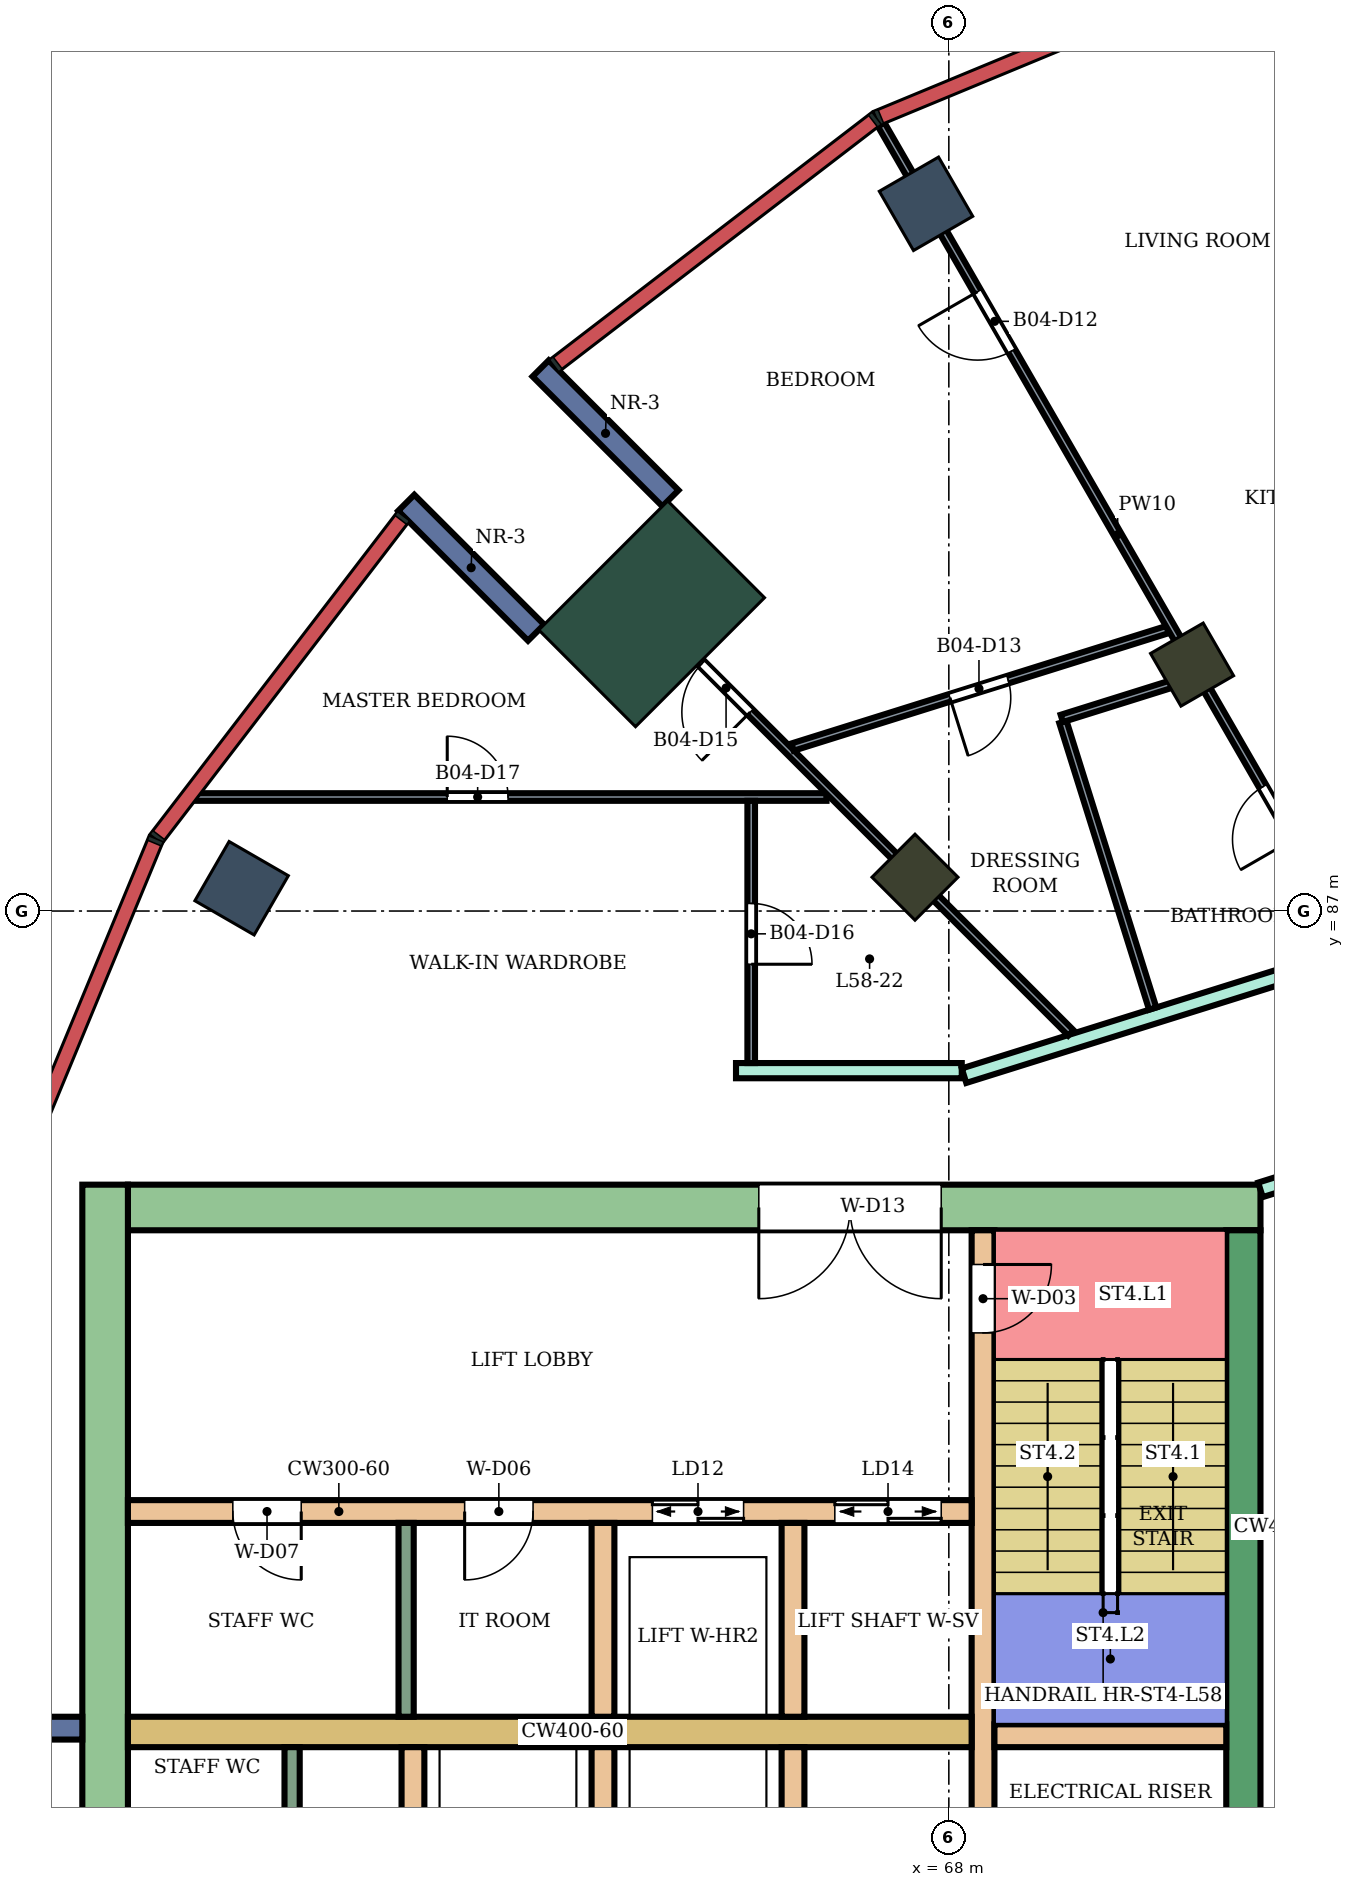
"""IFC4 building model, lengths in metres.
Left out: names, types, materials, properties, quantities, classifications, styles, units other than length and angle.
Written with IfcOpenShell. Run it as: python <this file> out.ifc"""

import sys

from ifc_helpers import new_model, si_unit, direction, frame, frame_2d, origin, origin_2d, place, context, subcontext, project, spatial, rectangle, extrude, element, fill, save


model = new_model("IFC4")
c1 = context("Model", 3, precision=1e-05, world=origin(), true_north=direction((0.0, 1.0)))
c2 = subcontext(c1, "Body", "Model", "MODEL_VIEW")
j1 = project(units=[si_unit("LENGTHUNIT", "METRE"), si_unit("PLANEANGLEUNIT", "RADIAN")], contexts=[c1])
p1 = place(None, origin())
s1 = spatial("IfcSite", under=j1, at=p1, CompositionType="ELEMENT")
p2 = place(p1, origin())
s2 = spatial("IfcBuilding", under=s1, at=p2, CompositionType="ELEMENT")
p3 = place(p2, frame((0.0, 0.0, 254.1)))
s3 = spatial("IfcBuildingStorey", under=s2, at=p3, CompositionType="ELEMENT", Elevation=254.1)
for number, where, z_axis, x_axis in (
    (1, (67.7, 96.304, 0.0), (0.0, 0.0, 1.0), (-0.5, 0.866, 0.0)),
    (2, (58.696, 87.3, 0.0), (0.0, 0.0, 1.0), (-0.866, 0.5, 0.0)),
):
    element("IfcColumn", number, at=place(p3, frame(where, z_axis=z_axis, x_axis=x_axis)), inside=s3, PredefinedType="COLUMN", context=c2, shape_type="SweptSolid", body=[
        extrude(rectangle(XDim=0.9, YDim=0.9, at=origin_2d()), origin(), (0.0, 0.0, 1.0), 4.2),
    ])
for number, where, z_axis, x_axis in (
    (3, (71.2, 90.242, 0.0), (0.0, 0.0, 1.0), (-0.5, 0.866, 0.0)),
    (4, (67.555, 87.445, 0.0), (0.0, 0.0, 1.0), (-0.707, 0.707, 0.0)),
):
    element("IfcColumn", number, at=place(p3, frame(where, z_axis=z_axis, x_axis=x_axis)), inside=s3, PredefinedType="COLUMN", context=c2, shape_type="SweptSolid", body=[
        extrude(rectangle(XDim=0.8, YDim=0.8, at=origin_2d()), origin(), (0.0, 0.0, 1.0), 4.2),
    ])
p4 = place(p3, frame((64.09, 90.91, 0.0), z_axis=(0.0, 0.0, 1.0), x_axis=(-0.707106781187, 0.707106781187, 0.0)))
e5 = element("IfcColumn", 5, at=p4, inside=s3, PredefinedType="COLUMN", context=c2, shape_type="SweptSolid", body=[
    extrude(rectangle(XDim=1.8, YDim=2.4, at=origin_2d()), origin(), (0.0, 0.0, 1.0), 4.2),
])
p5 = place(p3, frame((72.1, 83.1, 0.0), z_axis=(0.0, 0.0, 1.0), x_axis=(-1.0, 0.0, 0.0)))
e6 = element("IfcWall", 6, at=p5, inside=s3, PredefinedType="SHEAR", context=c2, shape_type="SweptSolid", body=[
    extrude(rectangle(XDim=14.9, YDim=0.6, at=frame_2d((7.45, 0.0))), origin(), (0.0, 0.0, 1.0), 3.88),
])
p6 = place(p5, frame((4.2, 0.0, 0.0)))
e7 = element("IfcOpeningElement", 7, at=p6, cuts=e6, PredefinedType="OPENING", context=c2, shape_type="SweptSolid", body=[
    extrude(rectangle(XDim=2.4, YDim=2.4, at=frame_2d((1.2, 1.2))), frame((0.0, 0.31, 0.0), z_axis=(0.0, -1.0, 0.0), x_axis=(1.0, 0.0, 0.0)), (0.0, 0.0, 1.0), 0.62),
])
p7 = place(p3, frame((71.875, 82.8, 0.0), z_axis=(0.0, 0.0, 1.0), x_axis=(0.0, -1.0, 0.0)))
e8 = element("IfcWall", 8, at=p7, inside=s3, PredefinedType="SHEAR", context=c2, shape_type="SweptSolid", body=[
    extrude(rectangle(XDim=7.8, YDim=0.45, at=frame_2d((3.9, 0.0))), origin(), (0.0, 0.0, 1.0), 3.88),
])
p8 = place(p3, frame((56.9, 83.4, 0.0), z_axis=(0.0, 0.0, 1.0), x_axis=(0.0, -1.0, 0.0)))
e9 = element("IfcWall", 9, at=p8, inside=s3, PredefinedType="SHEAR", context=c2, shape_type="SweptSolid", body=[
    extrude(rectangle(XDim=16.8, YDim=0.6, at=frame_2d((8.4, 0.0))), origin(), (0.0, 0.0, 1.0), 3.88),
])
p9 = place(p3, frame((68.45, 82.8, 0.0), z_axis=(0.0, 0.0, 1.0), x_axis=(0.0, -1.0, 0.0)))
e10 = element("IfcWall", 10, at=p9, inside=s3, PredefinedType="SHEAR", context=c2, shape_type="SweptSolid", body=[
    extrude(rectangle(XDim=7.8, YDim=0.3, at=frame_2d((3.9, 0.0))), origin(), (0.0, 0.0, 1.0), 3.88),
])
p10 = place(p9, frame((0.45, 0.0, 0.0)))
e11 = element("IfcOpeningElement", 11, at=p10, cuts=e10, PredefinedType="OPENING", context=c2, shape_type="SweptSolid", body=[
    extrude(rectangle(XDim=0.9, YDim=2.1, at=frame_2d((0.45, 1.05))), frame((0.0, 0.16, 0.0), z_axis=(0.0, -1.0, 0.0), x_axis=(1.0, 0.0, 0.0)), (0.0, 0.0, 1.0), 0.32),
])
p11 = place(p3, frame((71.65, 76.15, 0.0), z_axis=(0.0, 0.0, 1.0), x_axis=(-1.0, 0.0, 0.0)))
e12 = element("IfcWall", 12, at=p11, inside=s3, PredefinedType="SHEAR", context=c2, shape_type="SweptSolid", body=[
    extrude(rectangle(XDim=3.05, YDim=0.3, at=frame_2d((1.525, 0.0))), origin(), (0.0, 0.0, 1.0), 3.88),
])
p12 = place(p3, frame((68.3, 76.2, 0.0), z_axis=(0.0, 0.0, 1.0), x_axis=(-1.0, 0.0, 0.0)))
e13 = element("IfcWall", 13, at=p12, inside=s3, PredefinedType="SHEAR", context=c2, shape_type="SweptSolid", body=[
    extrude(rectangle(XDim=11.1, YDim=0.4, at=frame_2d((5.55, 0.0))), origin(), (0.0, 0.0, 1.0), 3.88),
])
p13 = place(p3, frame((68.3, 79.1, 0.0), z_axis=(0.0, 0.0, 1.0), x_axis=(-1.0, 0.0, 0.0)))
e14 = element("IfcWall", 14, at=p13, inside=s3, PredefinedType="SHEAR", context=c2, shape_type="SweptSolid", body=[
    extrude(rectangle(XDim=11.1, YDim=0.3, at=frame_2d((5.55, 0.0))), origin(), (0.0, 0.0, 1.0), 3.88),
])
p14 = place(p13, frame((0.4, 0.0, 0.0)))
e15 = element("IfcOpeningElement", 15, at=p14, cuts=e14, PredefinedType="OPENING", context=c2, shape_type="SweptSolid", body=[
    extrude(rectangle(XDim=1.4, YDim=2.1, at=frame_2d((0.7, 1.05))), frame((0.0, 0.16, 0.0), z_axis=(0.0, -1.0, 0.0), x_axis=(1.0, 0.0, 0.0)), (0.0, 0.0, 1.0), 0.32),
])
p15 = place(p13, frame((3.0, 0.0, 0.0)))
e16 = element("IfcOpeningElement", 16, at=p15, cuts=e14, PredefinedType="OPENING", context=c2, shape_type="SweptSolid", body=[
    extrude(rectangle(XDim=1.2, YDim=2.1, at=frame_2d((0.6, 1.05))), frame((0.0, 0.16, 0.0), z_axis=(0.0, -1.0, 0.0), x_axis=(1.0, 0.0, 0.0)), (0.0, 0.0, 1.0), 0.32),
])
p16 = place(p13, frame((5.77, 0.0, 0.0)))
e17 = element("IfcOpeningElement", 17, at=p16, cuts=e14, PredefinedType="OPENING", context=c2, shape_type="SweptSolid", body=[
    extrude(rectangle(XDim=0.9, YDim=2.1, at=frame_2d((0.45, 1.05))), frame((0.0, 0.16, 0.0), z_axis=(0.0, -1.0, 0.0), x_axis=(1.0, 0.0, 0.0)), (0.0, 0.0, 1.0), 0.32),
])
p17 = place(p13, frame((8.82, 0.0, 0.0)))
e18 = element("IfcOpeningElement", 18, at=p17, cuts=e14, PredefinedType="OPENING", context=c2, shape_type="SweptSolid", body=[
    extrude(rectangle(XDim=0.9, YDim=2.1, at=frame_2d((0.45, 1.05))), frame((0.0, 0.16, 0.0), z_axis=(0.0, -1.0, 0.0), x_axis=(1.0, 0.0, 0.0)), (0.0, 0.0, 1.0), 0.32),
])
for number, where, z_axis, x_axis in (
    (19, (65.95, 76.0, 0.0), (0.0, 0.0, 1.0), (0.0, -1.0, 0.0)),
    (20, (63.45, 76.0, 0.0), (0.0, 0.0, 1.0), (0.0, -1.0, 0.0)),
    (21, (60.95, 76.0, 0.0), (0.0, 0.0, 1.0), (0.0, -1.0, 0.0)),
    (22, (65.95, 78.95, 0.0), (0.0, 0.0, 1.0), (0.0, -1.0, 0.0)),
    (23, (63.45, 78.95, 0.0), (0.0, 0.0, 1.0), (0.0, -1.0, 0.0)),
):
    element("IfcWall", number, at=place(p3, frame(where, z_axis=z_axis, x_axis=x_axis)), inside=s3, PredefinedType="SHEAR", context=c2, shape_type="SweptSolid", body=[
        extrude(rectangle(XDim=2.55, YDim=0.3, at=frame_2d((1.275, 0.0))), origin(), (0.0, 0.0, 1.0), 3.88),
    ])
for number, where, z_axis, x_axis in (
    (24, (64.338, 92.43, 0.0), (0.0, 0.0, 1.0), (-0.707, 0.707, 0.0)),
    (25, (62.57, 90.662, 0.0), (0.0, 0.0, 1.0), (-0.707, 0.707, 0.0)),
    (26, (56.6, 76.25, 0.0), (0.0, 0.0, 1.0), (-1.0, 0.0, 0.0)),
):
    element("IfcWall", number, at=place(p3, frame(where, z_axis=z_axis, x_axis=x_axis)), inside=s3, PredefinedType="NOTDEFINED", context=c2, shape_type="SweptSolid", body=[
        extrude(rectangle(XDim=2.416, YDim=0.3, at=frame_2d((1.208, 0.0))), origin(), (0.0, 0.0, 1.0), 4.2),
    ])
p18 = place(p3, frame((65.2, 84.9, 0.0), z_axis=(0.0, 0.0, 1.0), x_axis=(1.0, 0.0, 0.0)))
e27 = element("IfcWall", 27, at=p18, inside=s3, PredefinedType="PARTITIONING", context=c2, shape_type="SweptSolid", body=[
    extrude(rectangle(XDim=2.97, YDim=0.2, at=frame_2d((1.485, 0.0))), origin(), (0.0, 0.0, 1.0), 3.75),
])
p19 = place(p3, frame((68.2, 84.834, 0.0), z_axis=(0.0, 0.0, 1.0), x_axis=(0.954260265251, 0.298977166624, 0.0)))
e28 = element("IfcWall", 28, at=p19, inside=s3, PredefinedType="PARTITIONING", context=c2, shape_type="SweptSolid", body=[
    extrude(rectangle(XDim=5.741, YDim=0.2, at=frame_2d((2.87, 0.0))), origin(), (0.0, 0.0, 1.0), 3.75),
])
p20 = place(p3, frame((72.1, 83.332, 0.0), z_axis=(0.0, 0.0, 1.0), x_axis=(0.954233106619, 0.299063836383, 0.0)))
e29 = element("IfcWall", 29, at=p20, inside=s3, PredefinedType="PARTITIONING", context=c2, shape_type="SweptSolid", body=[
    extrude(rectangle(XDim=2.414, YDim=0.2, at=frame_2d((1.207, 0.0))), origin(), (0.0, 0.0, 1.0), 3.75),
])
p21 = place(p20, frame((0.762, 0.0, 0.0)))
e30 = element("IfcOpeningElement", 30, at=p21, cuts=e29, PredefinedType="OPENING", context=c2, shape_type="SweptSolid", body=[
    extrude(rectangle(XDim=0.9, YDim=2.1, at=frame_2d((0.45, 1.05))), frame((0.0, 0.11, 0.0), z_axis=(0.0, -1.0, 0.0), x_axis=(1.0, 0.0, 0.0)), (0.0, 0.0, 1.0), 0.22),
])
p22 = place(p3, frame((58.072, 88.5, 0.0), z_axis=(0.0, 0.0, 1.0), x_axis=(1.0, 0.0, 0.0)))
e31 = element("IfcWall", 31, at=p22, inside=s3, PredefinedType="PARTITIONING", context=c2, shape_type="SweptSolid", body=[
    extrude(rectangle(XDim=8.319, YDim=0.1, at=frame_2d((4.159, 0.0))), origin(), (0.0, 0.0, 1.0), 3.75),
])
p23 = place(p22, frame((3.329, 0.0, 0.0)))
e32 = element("IfcOpeningElement", 32, at=p23, cuts=e31, PredefinedType="OPENING", context=c2, shape_type="SweptSolid", body=[
    extrude(rectangle(XDim=0.8, YDim=2.1, at=frame_2d((0.4, 1.05))), frame((0.0, 0.06, 0.0), z_axis=(0.0, -1.0, 0.0), x_axis=(1.0, 0.0, 0.0)), (0.0, 0.0, 1.0), 0.12),
])
p24 = place(p3, frame((63.597, 91.407, 0.0), z_axis=(0.0, 0.0, 1.0), x_axis=(0.70700623685, -0.707207311228, 0.0)))
e33 = element("IfcWall", 33, at=p24, inside=s3, PredefinedType="PARTITIONING", context=c2, shape_type="SweptSolid", body=[
    extrude(rectangle(XDim=8.499, YDim=0.1, at=frame_2d((4.25, 0.0))), origin(), (0.0, 0.0, 1.0), 3.75),
])
p25 = place(p24, frame((1.632, 0.0, 0.0)))
e34 = element("IfcOpeningElement", 34, at=p25, cuts=e33, PredefinedType="OPENING", context=c2, shape_type="SweptSolid", body=[
    extrude(rectangle(XDim=0.9, YDim=2.1, at=frame_2d((0.45, 1.05))), frame((0.0, 0.06, 0.0), z_axis=(0.0, -1.0, 0.0), x_axis=(1.0, 0.0, 0.0)), (0.0, 0.0, 1.0), 0.12),
])
p26 = place(p3, frame((65.4, 85.0, 0.0), z_axis=(0.0, 0.0, 1.0), x_axis=(0.0, 1.0, 0.0)))
e35 = element("IfcWall", 35, at=p26, inside=s3, PredefinedType="PARTITIONING", context=c2, shape_type="SweptSolid", body=[
    extrude(rectangle(XDim=3.45, YDim=0.1, at=frame_2d((1.725, 0.0))), origin(), (0.0, 0.0, 1.0), 3.75),
])
p27 = place(p26, frame((1.3, 0.0, 0.0)))
e36 = element("IfcOpeningElement", 36, at=p27, cuts=e35, PredefinedType="OPENING", context=c2, shape_type="SweptSolid", body=[
    extrude(rectangle(XDim=0.8, YDim=2.1, at=frame_2d((0.4, 1.05))), frame((0.0, 0.06, 0.0), z_axis=(0.0, -1.0, 0.0), x_axis=(1.0, 0.0, 0.0)), (0.0, 0.0, 1.0), 0.12),
])
p28 = place(p3, frame((65.944, 89.157, 0.0), z_axis=(0.0, 0.0, 1.0), x_axis=(0.954238484697, 0.299046675828, 0.0)))
e37 = element("IfcWall", 37, at=p28, inside=s3, PredefinedType="PARTITIONING", context=c2, shape_type="SweptSolid", body=[
    extrude(rectangle(XDim=5.169, YDim=0.1, at=frame_2d((2.585, 0.0))), origin(), (0.0, 0.0, 1.0), 3.75),
])
p29 = place(p28, frame((2.17, 0.0, 0.0)))
e38 = element("IfcOpeningElement", 38, at=p29, cuts=e37, PredefinedType="OPENING", context=c2, shape_type="SweptSolid", body=[
    extrude(rectangle(XDim=0.8, YDim=2.1, at=frame_2d((0.4, 1.05))), frame((0.0, 0.06, 0.0), z_axis=(0.0, -1.0, 0.0), x_axis=(1.0, 0.0, 0.0)), (0.0, 0.0, 1.0), 0.12),
])
p30 = place(p3, frame((67.111, 97.347, 0.0), z_axis=(0.0, 0.0, 1.0), x_axis=(0.499428303955, -0.866355221147, 0.0)))
e39 = element("IfcWall", 39, at=p30, inside=s3, PredefinedType="PARTITIONING", context=c2, shape_type="SweptSolid", body=[
    extrude(rectangle(XDim=12.456, YDim=0.1, at=frame_2d((6.228, 0.0))), origin(), (0.0, 0.0, 1.0), 3.75),
])
p31 = place(p30, frame((2.538, 0.0, 0.0)))
e40 = element("IfcOpeningElement", 40, at=p31, cuts=e39, PredefinedType="OPENING", context=c2, shape_type="SweptSolid", body=[
    extrude(rectangle(XDim=0.9, YDim=2.1, at=frame_2d((0.45, 1.05))), frame((0.0, 0.06, 0.0), z_axis=(0.0, -1.0, 0.0), x_axis=(1.0, 0.0, 0.0)), (0.0, 0.0, 1.0), 0.12),
])
p32 = place(p30, frame((10.055, 0.0, 0.0)))
e41 = element("IfcOpeningElement", 41, at=p32, cuts=e39, PredefinedType="OPENING", context=c2, shape_type="SweptSolid", body=[
    extrude(rectangle(XDim=0.8, YDim=2.1, at=frame_2d((0.4, 1.05))), frame((0.0, 0.06, 0.0), z_axis=(0.0, -1.0, 0.0), x_axis=(1.0, 0.0, 0.0)), (0.0, 0.0, 1.0), 0.12),
])
p33 = place(p3, frame((69.501, 89.486, 0.0), z_axis=(0.0, 0.0, 1.0), x_axis=(0.298971609069, -0.954262006459, 0.0)))
e42 = element("IfcWall", 42, at=p33, inside=s3, PredefinedType="PARTITIONING", context=c2, shape_type="SweptSolid", body=[
    extrude(rectangle(XDim=3.951, YDim=0.1, at=frame_2d((1.975, 0.0))), origin(), (0.0, 0.0, 1.0), 3.75),
])
p34 = place(p3, frame((69.486, 89.534, 0.0), z_axis=(0.0, 0.0, 1.0), x_axis=(0.954254575134, 0.298995327449, 0.0)))
e43 = element("IfcWall", 43, at=p34, inside=s3, PredefinedType="PARTITIONING", context=c2, shape_type="SweptSolid", body=[
    extrude(rectangle(XDim=1.833, YDim=0.1, at=frame_2d((0.917, 0.0))), origin(), (0.0, 0.0, 1.0), 3.75),
])
for number, where, z_axis, x_axis in (
    (44, (59.36, 76.0, 0.0), (0.0, 0.0, 1.0), (0.0, -1.0, 0.0)),
    (45, (60.86, 78.95, 0.0), (0.0, 0.0, 1.0), (0.0, -1.0, 0.0)),
):
    element("IfcWall", number, at=place(p3, frame(where, z_axis=z_axis, x_axis=x_axis)), inside=s3, PredefinedType="PARTITIONING", context=c2, shape_type="SweptSolid", body=[
        extrude(rectangle(XDim=2.55, YDim=0.2, at=frame_2d((1.275, 0.0))), origin(), (0.0, 0.0, 1.0), 3.88),
    ])
p35 = place(p31, frame((0.9, 0.0, 0.0), z_axis=(0.0, 0.0, 1.0), x_axis=(-1.0, 0.0, 0.0)))
e46 = element("IfcDoor", 46, at=p35, inside=s3, OperationType="SINGLE_SWING_RIGHT", PredefinedType="DOOR", context=c2, shape_type="SweptSolid", body=[
    extrude(rectangle(XDim=0.9, YDim=2.1, at=frame_2d((0.45, 1.05))), frame((0.0, 0.025, 0.0), z_axis=(0.0, -1.0, 0.0), x_axis=(1.0, 0.0, 0.0)), (0.0, 0.0, 1.0), 0.05),
])
fill(e40, e46)
p36 = place(p29, frame((0.8, 0.0, 0.0), z_axis=(0.0, 0.0, 1.0), x_axis=(-1.0, 0.0, 0.0)))
e47 = element("IfcDoor", 47, at=p36, inside=s3, OperationType="SINGLE_SWING_RIGHT", PredefinedType="DOOR", context=c2, shape_type="SweptSolid", body=[
    extrude(rectangle(XDim=0.8, YDim=2.1, at=frame_2d((0.4, 1.05))), frame((0.0, 0.025, 0.0), z_axis=(0.0, -1.0, 0.0), x_axis=(1.0, 0.0, 0.0)), (0.0, 0.0, 1.0), 0.05),
])
fill(e38, e47)
p37 = place(p32, frame((0.8, 0.0, 0.0), z_axis=(0.0, 0.0, 1.0), x_axis=(-1.0, 0.0, 0.0)))
e48 = element("IfcDoor", 48, at=p37, inside=s3, OperationType="SINGLE_SWING_LEFT", PredefinedType="DOOR", context=c2, shape_type="SweptSolid", body=[
    extrude(rectangle(XDim=0.8, YDim=2.1, at=frame_2d((0.4, 1.05))), frame((0.0, 0.025, 0.0), z_axis=(0.0, -1.0, 0.0), x_axis=(1.0, 0.0, 0.0)), (0.0, 0.0, 1.0), 0.05),
])
fill(e41, e48)
p38 = place(p25, frame((0.9, 0.0, 0.0), z_axis=(0.0, 0.0, 1.0), x_axis=(-1.0, 0.0, 0.0)))
e49 = element("IfcDoor", 49, at=p38, inside=s3, OperationType="SINGLE_SWING_LEFT", PredefinedType="DOOR", context=c2, shape_type="SweptSolid", body=[
    extrude(rectangle(XDim=0.9, YDim=2.1, at=frame_2d((0.45, 1.05))), frame((0.0, 0.025, 0.0), z_axis=(0.0, -1.0, 0.0), x_axis=(1.0, 0.0, 0.0)), (0.0, 0.0, 1.0), 0.05),
])
fill(e34, e49)
p39 = place(p27, frame((0.8, 0.0, 0.0), z_axis=(0.0, 0.0, 1.0), x_axis=(-1.0, 0.0, 0.0)))
e50 = element("IfcDoor", 50, at=p39, inside=s3, OperationType="SINGLE_SWING_RIGHT", PredefinedType="DOOR", context=c2, shape_type="SweptSolid", body=[
    extrude(rectangle(XDim=0.8, YDim=2.1, at=frame_2d((0.4, 1.05))), frame((0.0, 0.025, 0.0), z_axis=(0.0, -1.0, 0.0), x_axis=(1.0, 0.0, 0.0)), (0.0, 0.0, 1.0), 0.05),
])
fill(e36, e50)
p40 = place(p23, origin())
e51 = element("IfcDoor", 51, at=p40, inside=s3, OperationType="SINGLE_SWING_LEFT", PredefinedType="DOOR", context=c2, shape_type="SweptSolid", body=[
    extrude(rectangle(XDim=0.8, YDim=2.1, at=frame_2d((0.4, 1.05))), frame((0.0, 0.025, 0.0), z_axis=(0.0, -1.0, 0.0), x_axis=(1.0, 0.0, 0.0)), (0.0, 0.0, 1.0), 0.05),
])
fill(e32, e51)
p41 = place(p10, origin())
e52 = element("IfcDoor", 52, at=p41, inside=s3, OperationType="SINGLE_SWING_LEFT", PredefinedType="DOOR", context=c2, shape_type="SweptSolid", body=[
    extrude(rectangle(XDim=0.9, YDim=2.1, at=frame_2d((0.45, 1.05))), frame((0.0, 0.025, 0.0), z_axis=(0.0, -1.0, 0.0), x_axis=(1.0, 0.0, 0.0)), (0.0, 0.0, 1.0), 0.05),
])
fill(e11, e52)
p42 = place(p14, origin())
e53 = element("IfcDoor", 53, at=p42, inside=s3, OperationType="DOUBLE_DOOR_SLIDING", PredefinedType="DOOR", context=c2, shape_type="SweptSolid", body=[
    extrude(rectangle(XDim=1.4, YDim=2.1, at=frame_2d((0.7, 1.05))), frame((0.0, 0.025, 0.0), z_axis=(0.0, -1.0, 0.0), x_axis=(1.0, 0.0, 0.0)), (0.0, 0.0, 1.0), 0.05),
])
fill(e15, e53)
p43 = place(p15, origin())
e54 = element("IfcDoor", 54, at=p43, inside=s3, OperationType="DOUBLE_DOOR_SLIDING", PredefinedType="DOOR", context=c2, shape_type="SweptSolid", body=[
    extrude(rectangle(XDim=1.2, YDim=2.1, at=frame_2d((0.6, 1.05))), frame((0.0, 0.025, 0.0), z_axis=(0.0, -1.0, 0.0), x_axis=(1.0, 0.0, 0.0)), (0.0, 0.0, 1.0), 0.05),
])
fill(e16, e54)
p44 = place(p16, origin())
e55 = element("IfcDoor", 55, at=p44, inside=s3, OperationType="SINGLE_SWING_RIGHT", PredefinedType="DOOR", context=c2, shape_type="SweptSolid", body=[
    extrude(rectangle(XDim=0.9, YDim=2.1, at=frame_2d((0.45, 1.05))), frame((0.0, 0.025, 0.0), z_axis=(0.0, -1.0, 0.0), x_axis=(1.0, 0.0, 0.0)), (0.0, 0.0, 1.0), 0.05),
])
fill(e17, e55)
p45 = place(p17, origin())
e56 = element("IfcDoor", 56, at=p45, inside=s3, OperationType="SINGLE_SWING_LEFT", PredefinedType="DOOR", context=c2, shape_type="SweptSolid", body=[
    extrude(rectangle(XDim=0.9, YDim=2.1, at=frame_2d((0.45, 1.05))), frame((0.0, 0.025, 0.0), z_axis=(0.0, -1.0, 0.0), x_axis=(1.0, 0.0, 0.0)), (0.0, 0.0, 1.0), 0.05),
])
fill(e18, e56)
p46 = place(p6, origin())
e57 = element("IfcDoor", 57, at=p46, inside=s3, OperationType="DOUBLE_DOOR_SINGLE_SWING", PredefinedType="DOOR", context=c2, shape_type="SweptSolid", body=[
    extrude(rectangle(XDim=2.4, YDim=2.4, at=frame_2d((1.2, 1.2))), frame((0.0, 0.025, 0.0), z_axis=(0.0, -1.0, 0.0), x_axis=(1.0, 0.0, 0.0)), (0.0, 0.0, 1.0), 0.05),
])
fill(e7, e57)
save(model, sys.argv[1])
